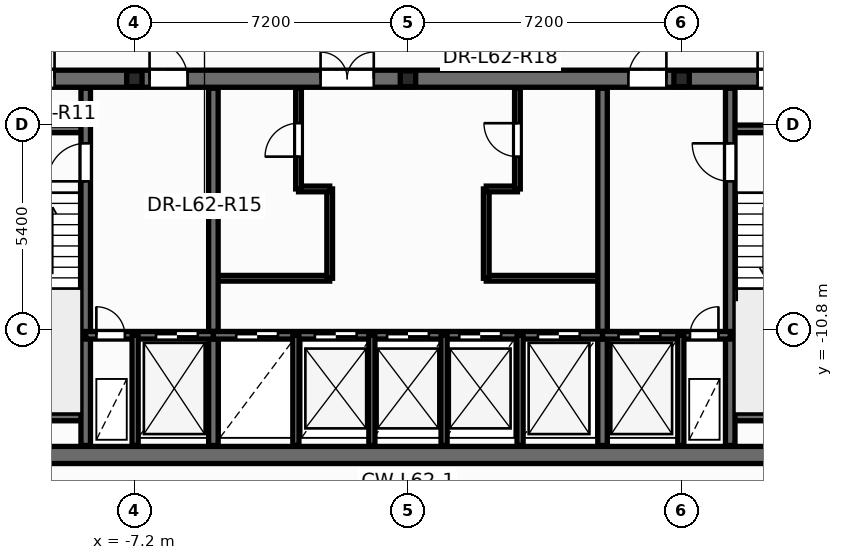
"""IFC4 building model, lengths in metres.
Left out: names, types, materials, properties, quantities, classifications, styles, units other than length and angle.
Written with IfcOpenShell. Run it as: python <this file> out.ifc"""

import sys

from ifc_helpers import new_model, si_unit, direction, frame, frame_2d, origin, origin_2d, place, context, subcontext, project, spatial, rectangle, i_section, extrude, element, fill, save


model = new_model("IFC4")
c1 = context("Model", 3, precision=1e-05, world=origin(), true_north=direction((0.0, 1.0)))
c2 = subcontext(c1, "Body", "Model", "MODEL_VIEW")
j1 = project(units=[si_unit("LENGTHUNIT", "METRE"), si_unit("PLANEANGLEUNIT", "RADIAN")], contexts=[c1])
p1 = place(None, origin())
s1 = spatial("IfcSite", under=j1, at=p1, CompositionType="ELEMENT")
p2 = place(p1, origin())
s2 = spatial("IfcBuilding", under=s1, at=p2, CompositionType="ELEMENT")
p3 = place(p2, frame((0.0, 0.0, 237.0)))
s3 = spatial("IfcBuildingStorey", under=s2, at=p3, CompositionType="ELEMENT", Elevation=237.0)
for number, where, z_axis, x_axis in (
    (1, (-7.2, -4.2, 0.0), (0.0, 0.0, 1.0), (1.0, 0.0, 0.0)),
    (2, (0.0, -4.2, 0.0), (0.0, 0.0, 1.0), (1.0, 0.0, 0.0)),
    (3, (7.2, -4.2, 0.0), (0.0, 0.0, 1.0), (1.0, 0.0, 0.0)),
):
    element("IfcColumn", number, at=place(p3, frame(where, z_axis=z_axis, x_axis=x_axis)), inside=s3, PredefinedType="PILASTER", context=c2, shape_type="SweptSolid", body=[
        extrude(i_section(OverallWidth=0.405, OverallDepth=0.414, WebThickness=0.022, FlangeThickness=0.032, at=origin_2d()), origin(), (0.0, 0.0, 1.0), 3.6),
    ])
p4 = place(p3, frame((-5.12, -9.45, 0.0), z_axis=(0.0, 0.0, 1.0), x_axis=(1.0, 0.0, 0.0)))
e4 = element("IfcWall", 4, at=p4, inside=s3, PredefinedType="PARTITIONING", context=c2, shape_type="SweptSolid", body=[
    extrude(rectangle(XDim=3.06, YDim=0.15, at=frame_2d((1.53, 0.0))), origin(), (0.0, 0.0, 1.0), 3.345),
])
p5 = place(p3, frame((-2.06, -9.45, 0.0), z_axis=(0.0, 0.0, 1.0), x_axis=(0.0, 1.0, 0.0)))
e5 = element("IfcWall", 5, at=p5, inside=s3, PredefinedType="PARTITIONING", context=c2, shape_type="SweptSolid", body=[
    extrude(rectangle(XDim=2.35, YDim=0.15, at=frame_2d((1.175, 0.0))), origin(), (0.0, 0.0, 1.0), 3.345),
])
p6 = place(p3, frame((-2.88, -7.1, 0.0), z_axis=(0.0, 0.0, 1.0), x_axis=(1.0, 0.0, 0.0)))
e6 = element("IfcWall", 6, at=p6, inside=s3, PredefinedType="PARTITIONING", context=c2, shape_type="SweptSolid", body=[
    extrude(rectangle(XDim=0.82, YDim=0.15, at=frame_2d((0.41, 0.0))), origin(), (0.0, 0.0, 1.0), 3.345),
])
p7 = place(p3, frame((-2.88, -7.1, 0.0), z_axis=(0.0, 0.0, 1.0), x_axis=(0.0, 1.0, 0.0)))
e7 = element("IfcWall", 7, at=p7, inside=s3, PredefinedType="PARTITIONING", context=c2, shape_type="SweptSolid", body=[
    extrude(rectangle(XDim=2.65, YDim=0.15, at=frame_2d((1.325, 0.0))), origin(), (0.0, 0.0, 1.0), 3.345),
])
p8 = place(p7, frame((0.85, 0.0, 0.0)))
e8 = element("IfcOpeningElement", 8, at=p8, cuts=e7, PredefinedType="OPENING", context=c2, shape_type="SweptSolid", body=[
    extrude(rectangle(XDim=0.886, YDim=2.104, at=frame_2d((0.44, 1.052))), frame((0.0, 0.085, 0.0), z_axis=(0.0, -1.0, 0.0), x_axis=(1.0, 0.0, 0.0)), (0.0, 0.0, 1.0), 0.17),
])
p9 = place(p3, frame((2.06, -9.45, 0.0), z_axis=(0.0, 0.0, 1.0), x_axis=(1.0, 0.0, 0.0)))
e9 = element("IfcWall", 9, at=p9, inside=s3, PredefinedType="PARTITIONING", context=c2, shape_type="SweptSolid", body=[
    extrude(rectangle(XDim=3.06, YDim=0.15, at=frame_2d((1.53, 0.0))), origin(), (0.0, 0.0, 1.0), 3.345),
])
p10 = place(p3, frame((2.06, -9.45, 0.0), z_axis=(0.0, 0.0, 1.0), x_axis=(0.0, 1.0, 0.0)))
e10 = element("IfcWall", 10, at=p10, inside=s3, PredefinedType="PARTITIONING", context=c2, shape_type="SweptSolid", body=[
    extrude(rectangle(XDim=2.35, YDim=0.15, at=frame_2d((1.175, 0.0))), origin(), (0.0, 0.0, 1.0), 3.345),
])
p11 = place(p3, frame((2.06, -7.1, 0.0), z_axis=(0.0, 0.0, 1.0), x_axis=(1.0, 0.0, 0.0)))
e11 = element("IfcWall", 11, at=p11, inside=s3, PredefinedType="PARTITIONING", context=c2, shape_type="SweptSolid", body=[
    extrude(rectangle(XDim=0.82, YDim=0.15, at=frame_2d((0.41, 0.0))), origin(), (0.0, 0.0, 1.0), 3.345),
])
p12 = place(p3, frame((2.88, -7.1, 0.0), z_axis=(0.0, 0.0, 1.0), x_axis=(0.0, 1.0, 0.0)))
e12 = element("IfcWall", 12, at=p12, inside=s3, PredefinedType="PARTITIONING", context=c2, shape_type="SweptSolid", body=[
    extrude(rectangle(XDim=2.65, YDim=0.15, at=frame_2d((1.325, 0.0))), origin(), (0.0, 0.0, 1.0), 3.345),
])
p13 = place(p12, frame((0.85, 0.0, 0.0)))
e13 = element("IfcOpeningElement", 13, at=p13, cuts=e12, PredefinedType="OPENING", context=c2, shape_type="SweptSolid", body=[
    extrude(rectangle(XDim=0.886, YDim=2.104, at=frame_2d((0.44, 1.052))), frame((0.0, 0.085, 0.0), z_axis=(0.0, -1.0, 0.0), x_axis=(1.0, 0.0, 0.0)), (0.0, 0.0, 1.0), 0.17),
])
p14 = place(p3, frame((-12.65, -14.1, 0.0), z_axis=(0.0, 0.0, 1.0), x_axis=(1.0, 0.0, 0.0)))
e14 = element("IfcWall", 14, at=p14, inside=s3, PredefinedType="SHEAR", context=c2, shape_type="SweptSolid", body=[
    extrude(rectangle(XDim=25.3, YDim=0.45, at=frame_2d((12.65, 0.0))), origin(), (0.0, 0.0, 1.0), 3.6),
])
p15 = place(p3, frame((-12.65, -4.2, 0.0), z_axis=(0.0, 0.0, 1.0), x_axis=(1.0, 0.0, 0.0)))
e15 = element("IfcWall", 15, at=p15, inside=s3, PredefinedType="SHEAR", context=c2, shape_type="SweptSolid", body=[
    extrude(rectangle(XDim=25.3, YDim=0.45, at=frame_2d((12.65, 0.0))), origin(), (0.0, 0.0, 1.0), 3.6),
])
p16 = place(p15, frame((0.95, 0.0, 0.0)))
e16 = element("IfcOpeningElement", 16, at=p16, cuts=e15, PredefinedType="OPENING", context=c2, shape_type="SweptSolid", body=[
    extrude(rectangle(XDim=0.756, YDim=2.054, at=frame_2d((0.375, 1.027))), frame((0.0, 0.235, 0.0), z_axis=(0.0, -1.0, 0.0), x_axis=(1.0, 0.0, 0.0)), (0.0, 0.0, 1.0), 0.47),
])
p17 = place(p15, frame((2.6, 0.0, 0.0)))
e17 = element("IfcOpeningElement", 17, at=p17, cuts=e15, PredefinedType="OPENING", context=c2, shape_type="SweptSolid", body=[
    extrude(rectangle(XDim=0.756, YDim=2.054, at=frame_2d((0.375, 1.027))), frame((0.0, 0.235, 0.0), z_axis=(0.0, -1.0, 0.0), x_axis=(1.0, 0.0, 0.0)), (0.0, 0.0, 1.0), 0.47),
])
p18 = place(p15, frame((21.85, 0.0, 0.0)))
e18 = element("IfcOpeningElement", 18, at=p18, cuts=e15, PredefinedType="OPENING", context=c2, shape_type="SweptSolid", body=[
    extrude(rectangle(XDim=0.756, YDim=2.054, at=frame_2d((0.375, 1.027))), frame((0.0, 0.235, 0.0), z_axis=(0.0, -1.0, 0.0), x_axis=(1.0, 0.0, 0.0)), (0.0, 0.0, 1.0), 0.47),
])
p19 = place(p15, frame((23.5, 0.0, 0.0)))
e19 = element("IfcOpeningElement", 19, at=p19, cuts=e15, PredefinedType="OPENING", context=c2, shape_type="SweptSolid", body=[
    extrude(rectangle(XDim=0.756, YDim=2.054, at=frame_2d((0.375, 1.027))), frame((0.0, 0.235, 0.0), z_axis=(0.0, -1.0, 0.0), x_axis=(1.0, 0.0, 0.0)), (0.0, 0.0, 1.0), 0.47),
])
p20 = place(p15, frame((5.85, 0.0, 0.0)))
e20 = element("IfcOpeningElement", 20, at=p20, cuts=e15, PredefinedType="OPENING", context=c2, shape_type="SweptSolid", body=[
    extrude(rectangle(XDim=1.006, YDim=2.104, at=frame_2d((0.5, 1.052))), frame((0.0, 0.235, 0.0), z_axis=(0.0, -1.0, 0.0), x_axis=(1.0, 0.0, 0.0)), (0.0, 0.0, 1.0), 0.47),
])
p21 = place(p15, frame((10.35, 0.0, 0.0)))
e21 = element("IfcOpeningElement", 21, at=p21, cuts=e15, PredefinedType="OPENING", context=c2, shape_type="SweptSolid", body=[
    extrude(rectangle(XDim=1.406, YDim=2.154, at=frame_2d((0.7, 1.077))), frame((0.0, 0.235, 0.0), z_axis=(0.0, -1.0, 0.0), x_axis=(1.0, 0.0, 0.0)), (0.0, 0.0, 1.0), 0.47),
])
p22 = place(p15, frame((18.45, 0.0, 0.0)))
e22 = element("IfcOpeningElement", 22, at=p22, cuts=e15, PredefinedType="OPENING", context=c2, shape_type="SweptSolid", body=[
    extrude(rectangle(XDim=1.006, YDim=2.104, at=frame_2d((0.5, 1.052))), frame((0.0, 0.235, 0.0), z_axis=(0.0, -1.0, 0.0), x_axis=(1.0, 0.0, 0.0)), (0.0, 0.0, 1.0), 0.47),
])
for number, where, z_axis, x_axis in (
    (23, (-12.35, -5.52, 0.0), (0.0, 0.0, 1.0), (1.0, 0.0, 0.0)),
    (24, (-12.35, -13.1, 0.0), (0.0, 0.0, 1.0), (1.0, 0.0, 0.0)),
    (25, (8.48, -5.52, 0.0), (0.0, 0.0, 1.0), (1.0, 0.0, 0.0)),
    (26, (8.48, -13.1, 0.0), (0.0, 0.0, 1.0), (1.0, 0.0, 0.0)),
):
    element("IfcWall", number, at=place(p3, frame(where, z_axis=z_axis, x_axis=x_axis)), inside=s3, PredefinedType="SOLIDWALL", context=c2, shape_type="SweptSolid", body=[
        extrude(rectangle(XDim=3.87, YDim=0.2, at=frame_2d((1.935, 0.0))), origin(), (0.0, 0.0, 1.0), 3.6),
    ])
p23 = place(p3, frame((-8.48, -13.85, 0.0), z_axis=(0.0, 0.0, 1.0), x_axis=(0.0, 1.0, 0.0)))
e27 = element("IfcWall", 27, at=p23, inside=s3, PredefinedType="SHEAR", context=c2, shape_type="SweptSolid", body=[
    extrude(rectangle(XDim=9.4, YDim=0.25, at=frame_2d((4.7, 0.0))), origin(), (0.0, 0.0, 1.0), 3.6),
])
p24 = place(p23, frame((6.95, 0.0, 0.0)))
e28 = element("IfcOpeningElement", 28, at=p24, cuts=e27, PredefinedType="OPENING", context=c2, shape_type="SweptSolid", body=[
    extrude(rectangle(XDim=1.006, YDim=2.104, at=frame_2d((0.5, 1.052))), frame((0.0, 0.135, 0.0), z_axis=(0.0, -1.0, 0.0), x_axis=(1.0, 0.0, 0.0)), (0.0, 0.0, 1.0), 0.27),
])
p25 = place(p3, frame((8.48, -13.85, 0.0), z_axis=(0.0, 0.0, 1.0), x_axis=(0.0, 1.0, 0.0)))
e29 = element("IfcWall", 29, at=p25, inside=s3, PredefinedType="SHEAR", context=c2, shape_type="SweptSolid", body=[
    extrude(rectangle(XDim=9.4, YDim=0.25, at=frame_2d((4.7, 0.0))), origin(), (0.0, 0.0, 1.0), 3.6),
])
p26 = place(p25, frame((6.95, 0.0, 0.0)))
e30 = element("IfcOpeningElement", 30, at=p26, cuts=e29, PredefinedType="OPENING", context=c2, shape_type="SweptSolid", body=[
    extrude(rectangle(XDim=1.006, YDim=2.104, at=frame_2d((0.5, 1.052))), frame((0.0, 0.135, 0.0), z_axis=(0.0, -1.0, 0.0), x_axis=(1.0, 0.0, 0.0)), (0.0, 0.0, 1.0), 0.27),
])
for number, where, z_axis, x_axis in (
    (31, (-5.12, -13.85, 0.0), (0.0, 0.0, 1.0), (0.0, 1.0, 0.0)),
    (32, (5.12, -13.85, 0.0), (0.0, 0.0, 1.0), (0.0, 1.0, 0.0)),
):
    element("IfcWall", number, at=place(p3, frame(where, z_axis=z_axis, x_axis=x_axis)), inside=s3, PredefinedType="SHEAR", context=c2, shape_type="SweptSolid", body=[
        extrude(rectangle(XDim=9.4, YDim=0.25, at=frame_2d((4.7, 0.0))), origin(), (0.0, 0.0, 1.0), 3.6),
    ])
p27 = place(p3, frame((-8.48, -10.95, 0.0), z_axis=(0.0, 0.0, 1.0), x_axis=(1.0, 0.0, 0.0)))
e33 = element("IfcWall", 33, at=p27, inside=s3, PredefinedType="SOLIDWALL", context=c2, shape_type="SweptSolid", body=[
    extrude(rectangle(XDim=3.36, YDim=0.2, at=frame_2d((1.68, 0.0))), origin(), (0.0, 0.0, 1.0), 3.6),
])
p28 = place(p27, frame((0.28, 0.0, 0.0)))
e34 = element("IfcOpeningElement", 34, at=p28, cuts=e33, PredefinedType="OPENING", context=c2, shape_type="SweptSolid", body=[
    extrude(rectangle(XDim=0.756, YDim=2.054, at=frame_2d((0.375, 1.027))), frame((0.0, 0.11, 0.0), z_axis=(0.0, -1.0, 0.0), x_axis=(1.0, 0.0, 0.0)), (0.0, 0.0, 1.0), 0.22),
])
p29 = place(p27, frame((1.85, 0.0, 0.0)))
e35 = element("IfcOpeningElement", 35, at=p29, cuts=e33, PredefinedType="OPENING", context=c2, shape_type="SweptSolid", body=[
    extrude(rectangle(XDim=1.106, YDim=2.104, at=frame_2d((0.55, 1.052))), frame((0.0, 0.11, 0.0), z_axis=(0.0, -1.0, 0.0), x_axis=(1.0, 0.0, 0.0)), (0.0, 0.0, 1.0), 0.22),
])
p30 = place(p3, frame((-5.12, -10.95, 0.0), z_axis=(0.0, 0.0, 1.0), x_axis=(1.0, 0.0, 0.0)))
e36 = element("IfcWall", 36, at=p30, inside=s3, PredefinedType="SOLIDWALL", context=c2, shape_type="SweptSolid", body=[
    extrude(rectangle(XDim=10.24, YDim=0.2, at=frame_2d((5.12, 0.0))), origin(), (0.0, 0.0, 1.0), 3.6),
])
p31 = place(p30, frame((0.6, 0.0, 0.0)))
e37 = element("IfcOpeningElement", 37, at=p31, cuts=e36, PredefinedType="OPENING", context=c2, shape_type="SweptSolid", body=[
    extrude(rectangle(XDim=1.106, YDim=2.104, at=frame_2d((0.55, 1.052))), frame((0.0, 0.11, 0.0), z_axis=(0.0, -1.0, 0.0), x_axis=(1.0, 0.0, 0.0)), (0.0, 0.0, 1.0), 0.22),
])
p32 = place(p30, frame((2.67, 0.0, 0.0)))
e38 = element("IfcOpeningElement", 38, at=p32, cuts=e36, PredefinedType="OPENING", context=c2, shape_type="SweptSolid", body=[
    extrude(rectangle(XDim=1.106, YDim=2.104, at=frame_2d((0.55, 1.052))), frame((0.0, 0.11, 0.0), z_axis=(0.0, -1.0, 0.0), x_axis=(1.0, 0.0, 0.0)), (0.0, 0.0, 1.0), 0.22),
])
p33 = place(p30, frame((4.57, 0.0, 0.0)))
e39 = element("IfcOpeningElement", 39, at=p33, cuts=e36, PredefinedType="OPENING", context=c2, shape_type="SweptSolid", body=[
    extrude(rectangle(XDim=1.106, YDim=2.104, at=frame_2d((0.55, 1.052))), frame((0.0, 0.11, 0.0), z_axis=(0.0, -1.0, 0.0), x_axis=(1.0, 0.0, 0.0)), (0.0, 0.0, 1.0), 0.22),
])
p34 = place(p30, frame((6.47, 0.0, 0.0)))
e40 = element("IfcOpeningElement", 40, at=p34, cuts=e36, PredefinedType="OPENING", context=c2, shape_type="SweptSolid", body=[
    extrude(rectangle(XDim=1.106, YDim=2.104, at=frame_2d((0.55, 1.052))), frame((0.0, 0.11, 0.0), z_axis=(0.0, -1.0, 0.0), x_axis=(1.0, 0.0, 0.0)), (0.0, 0.0, 1.0), 0.22),
])
p35 = place(p30, frame((8.54, 0.0, 0.0)))
e41 = element("IfcOpeningElement", 41, at=p35, cuts=e36, PredefinedType="OPENING", context=c2, shape_type="SweptSolid", body=[
    extrude(rectangle(XDim=1.106, YDim=2.104, at=frame_2d((0.55, 1.052))), frame((0.0, 0.11, 0.0), z_axis=(0.0, -1.0, 0.0), x_axis=(1.0, 0.0, 0.0)), (0.0, 0.0, 1.0), 0.22),
])
p36 = place(p3, frame((5.12, -10.95, 0.0), z_axis=(0.0, 0.0, 1.0), x_axis=(1.0, 0.0, 0.0)))
e42 = element("IfcWall", 42, at=p36, inside=s3, PredefinedType="SOLIDWALL", context=c2, shape_type="SweptSolid", body=[
    extrude(rectangle(XDim=3.36, YDim=0.2, at=frame_2d((1.68, 0.0))), origin(), (0.0, 0.0, 1.0), 3.6),
])
p37 = place(p36, frame((0.42, 0.0, 0.0)))
e43 = element("IfcOpeningElement", 43, at=p37, cuts=e42, PredefinedType="OPENING", context=c2, shape_type="SweptSolid", body=[
    extrude(rectangle(XDim=1.106, YDim=2.104, at=frame_2d((0.55, 1.052))), frame((0.0, 0.11, 0.0), z_axis=(0.0, -1.0, 0.0), x_axis=(1.0, 0.0, 0.0)), (0.0, 0.0, 1.0), 0.22),
])
p38 = place(p36, frame((2.3, 0.0, 0.0)))
e44 = element("IfcOpeningElement", 44, at=p38, cuts=e42, PredefinedType="OPENING", context=c2, shape_type="SweptSolid", body=[
    extrude(rectangle(XDim=0.756, YDim=2.054, at=frame_2d((0.375, 1.027))), frame((0.0, 0.11, 0.0), z_axis=(0.0, -1.0, 0.0), x_axis=(1.0, 0.0, 0.0)), (0.0, 0.0, 1.0), 0.22),
])
for number, where, z_axis, x_axis in (
    (45, (-7.18, -13.85, 0.0), (0.0, 0.0, 1.0), (0.0, 1.0, 0.0)),
    (46, (7.18, -13.85, 0.0), (0.0, 0.0, 1.0), (0.0, 1.0, 0.0)),
    (47, (-2.95, -13.85, 0.0), (0.0, 0.0, 1.0), (0.0, 1.0, 0.0)),
    (48, (2.95, -13.85, 0.0), (0.0, 0.0, 1.0), (0.0, 1.0, 0.0)),
    (49, (-0.95, -13.85, 0.0), (0.0, 0.0, 1.0), (0.0, 1.0, 0.0)),
    (50, (0.95, -13.85, 0.0), (0.0, 0.0, 1.0), (0.0, 1.0, 0.0)),
):
    element("IfcWall", number, at=place(p3, frame(where, z_axis=z_axis, x_axis=x_axis)), inside=s3, PredefinedType="PARTITIONING", context=c2, shape_type="SweptSolid", body=[
        extrude(rectangle(XDim=2.9, YDim=0.16, at=frame_2d((1.45, 0.0))), origin(), (0.0, 0.0, 1.0), 2.57),
    ])
p39 = place(p8, origin())
e51 = element("IfcDoor", 51, at=p39, inside=s3, OperationType="SINGLE_SWING_LEFT", PredefinedType="DOOR", context=c2, shape_type="SweptSolid", body=[
    extrude(rectangle(XDim=0.88, YDim=2.1, at=frame_2d((0.44, 1.05))), frame((0.0, 0.025, 0.0), z_axis=(0.0, -1.0, 0.0), x_axis=(1.0, 0.0, 0.0)), (0.0, 0.0, 1.0), 0.05),
])
fill(e8, e51)
p40 = place(p13, origin())
e52 = element("IfcDoor", 52, at=p40, inside=s3, OperationType="SINGLE_SWING_RIGHT", PredefinedType="DOOR", context=c2, shape_type="SweptSolid", body=[
    extrude(rectangle(XDim=0.88, YDim=2.1, at=frame_2d((0.44, 1.05))), frame((0.0, 0.025, 0.0), z_axis=(0.0, -1.0, 0.0), x_axis=(1.0, 0.0, 0.0)), (0.0, 0.0, 1.0), 0.05),
])
fill(e13, e52)
p41 = place(p24, origin())
e53 = element("IfcDoor", 53, at=p41, inside=s3, OperationType="SINGLE_SWING_LEFT", PredefinedType="DOOR", context=c2, shape_type="SweptSolid", body=[
    extrude(rectangle(XDim=1.0, YDim=2.1, at=frame_2d((0.5, 1.05))), frame((0.0, 0.025, 0.0), z_axis=(0.0, -1.0, 0.0), x_axis=(1.0, 0.0, 0.0)), (0.0, 0.0, 1.0), 0.05),
])
fill(e28, e53)
p42 = place(p26, origin())
e54 = element("IfcDoor", 54, at=p42, inside=s3, OperationType="SINGLE_SWING_RIGHT", PredefinedType="DOOR", context=c2, shape_type="SweptSolid", body=[
    extrude(rectangle(XDim=1.0, YDim=2.1, at=frame_2d((0.5, 1.05))), frame((0.0, 0.025, 0.0), z_axis=(0.0, -1.0, 0.0), x_axis=(1.0, 0.0, 0.0)), (0.0, 0.0, 1.0), 0.05),
])
fill(e30, e54)
p43 = place(p28, origin())
e55 = element("IfcDoor", 55, at=p43, inside=s3, OperationType="SINGLE_SWING_LEFT", PredefinedType="DOOR", context=c2, shape_type="SweptSolid", body=[
    extrude(rectangle(XDim=0.75, YDim=2.05, at=frame_2d((0.375, 1.025))), frame((0.0, 0.025, 0.0), z_axis=(0.0, -1.0, 0.0), x_axis=(1.0, 0.0, 0.0)), (0.0, 0.0, 1.0), 0.05),
])
fill(e34, e55)
p44 = place(p29, origin())
e56 = element("IfcDoor", 56, at=p44, inside=s3, OperationType="DOUBLE_DOOR_SLIDING", PredefinedType="DOOR", context=c2, shape_type="SweptSolid", body=[
    extrude(rectangle(XDim=1.1, YDim=2.1, at=frame_2d((0.55, 1.05))), frame((0.0, 0.025, 0.0), z_axis=(0.0, -1.0, 0.0), x_axis=(1.0, 0.0, 0.0)), (0.0, 0.0, 1.0), 0.05),
])
fill(e35, e56)
p45 = place(p37, origin())
e57 = element("IfcDoor", 57, at=p45, inside=s3, OperationType="DOUBLE_DOOR_SLIDING", PredefinedType="DOOR", context=c2, shape_type="SweptSolid", body=[
    extrude(rectangle(XDim=1.1, YDim=2.1, at=frame_2d((0.55, 1.05))), frame((0.0, 0.025, 0.0), z_axis=(0.0, -1.0, 0.0), x_axis=(1.0, 0.0, 0.0)), (0.0, 0.0, 1.0), 0.05),
])
fill(e43, e57)
p46 = place(p38, origin())
e58 = element("IfcDoor", 58, at=p46, inside=s3, OperationType="SINGLE_SWING_RIGHT", PredefinedType="DOOR", context=c2, shape_type="SweptSolid", body=[
    extrude(rectangle(XDim=0.75, YDim=2.05, at=frame_2d((0.375, 1.025))), frame((0.0, 0.025, 0.0), z_axis=(0.0, -1.0, 0.0), x_axis=(1.0, 0.0, 0.0)), (0.0, 0.0, 1.0), 0.05),
])
fill(e44, e58)
p47 = place(p31, origin())
e59 = element("IfcDoor", 59, at=p47, inside=s3, OperationType="DOUBLE_DOOR_SLIDING", PredefinedType="DOOR", context=c2, shape_type="SweptSolid", body=[
    extrude(rectangle(XDim=1.1, YDim=2.1, at=frame_2d((0.55, 1.05))), frame((0.0, 0.025, 0.0), z_axis=(0.0, -1.0, 0.0), x_axis=(1.0, 0.0, 0.0)), (0.0, 0.0, 1.0), 0.05),
])
fill(e37, e59)
p48 = place(p32, origin())
e60 = element("IfcDoor", 60, at=p48, inside=s3, OperationType="DOUBLE_DOOR_SLIDING", PredefinedType="DOOR", context=c2, shape_type="SweptSolid", body=[
    extrude(rectangle(XDim=1.1, YDim=2.1, at=frame_2d((0.55, 1.05))), frame((0.0, 0.025, 0.0), z_axis=(0.0, -1.0, 0.0), x_axis=(1.0, 0.0, 0.0)), (0.0, 0.0, 1.0), 0.05),
])
fill(e38, e60)
p49 = place(p33, origin())
e61 = element("IfcDoor", 61, at=p49, inside=s3, OperationType="DOUBLE_DOOR_SLIDING", PredefinedType="DOOR", context=c2, shape_type="SweptSolid", body=[
    extrude(rectangle(XDim=1.1, YDim=2.1, at=frame_2d((0.55, 1.05))), frame((0.0, 0.025, 0.0), z_axis=(0.0, -1.0, 0.0), x_axis=(1.0, 0.0, 0.0)), (0.0, 0.0, 1.0), 0.05),
])
fill(e39, e61)
p50 = place(p34, origin())
e62 = element("IfcDoor", 62, at=p50, inside=s3, OperationType="DOUBLE_DOOR_SLIDING", PredefinedType="DOOR", context=c2, shape_type="SweptSolid", body=[
    extrude(rectangle(XDim=1.1, YDim=2.1, at=frame_2d((0.55, 1.05))), frame((0.0, 0.025, 0.0), z_axis=(0.0, -1.0, 0.0), x_axis=(1.0, 0.0, 0.0)), (0.0, 0.0, 1.0), 0.05),
])
fill(e40, e62)
p51 = place(p35, origin())
e63 = element("IfcDoor", 63, at=p51, inside=s3, OperationType="DOUBLE_DOOR_SLIDING", PredefinedType="DOOR", context=c2, shape_type="SweptSolid", body=[
    extrude(rectangle(XDim=1.1, YDim=2.1, at=frame_2d((0.55, 1.05))), frame((0.0, 0.025, 0.0), z_axis=(0.0, -1.0, 0.0), x_axis=(1.0, 0.0, 0.0)), (0.0, 0.0, 1.0), 0.05),
])
fill(e41, e63)
p52 = place(p17, origin())
e64 = element("IfcDoor", 64, at=p52, inside=s3, OperationType="SINGLE_SWING_RIGHT", PredefinedType="DOOR", context=c2, shape_type="SweptSolid", body=[
    extrude(rectangle(XDim=0.75, YDim=2.05, at=frame_2d((0.375, 1.025))), frame((0.0, 0.025, 0.0), z_axis=(0.0, -1.0, 0.0), x_axis=(1.0, 0.0, 0.0)), (0.0, 0.0, 1.0), 0.05),
])
fill(e17, e64)
p53 = place(p18, origin())
e65 = element("IfcDoor", 65, at=p53, inside=s3, OperationType="SINGLE_SWING_LEFT", PredefinedType="DOOR", context=c2, shape_type="SweptSolid", body=[
    extrude(rectangle(XDim=0.75, YDim=2.05, at=frame_2d((0.375, 1.025))), frame((0.0, 0.025, 0.0), z_axis=(0.0, -1.0, 0.0), x_axis=(1.0, 0.0, 0.0)), (0.0, 0.0, 1.0), 0.05),
])
fill(e18, e65)
p54 = place(p20, origin())
e66 = element("IfcDoor", 66, at=p54, inside=s3, OperationType="SINGLE_SWING_LEFT", PredefinedType="DOOR", context=c2, shape_type="SweptSolid", body=[
    extrude(rectangle(XDim=1.0, YDim=2.1, at=frame_2d((0.5, 1.05))), frame((0.0, 0.025, 0.0), z_axis=(0.0, -1.0, 0.0), x_axis=(1.0, 0.0, 0.0)), (0.0, 0.0, 1.0), 0.05),
])
fill(e20, e66)
p55 = place(p21, origin())
e67 = element("IfcDoor", 67, at=p55, inside=s3, OperationType="DOUBLE_DOOR_SINGLE_SWING", PredefinedType="DOOR", context=c2, shape_type="SweptSolid", body=[
    extrude(rectangle(XDim=1.4, YDim=2.15, at=frame_2d((0.7, 1.075))), frame((0.0, 0.025, 0.0), z_axis=(0.0, -1.0, 0.0), x_axis=(1.0, 0.0, 0.0)), (0.0, 0.0, 1.0), 0.05),
])
fill(e21, e67)
p56 = place(p22, origin())
e68 = element("IfcDoor", 68, at=p56, inside=s3, OperationType="SINGLE_SWING_RIGHT", PredefinedType="DOOR", context=c2, shape_type="SweptSolid", body=[
    extrude(rectangle(XDim=1.0, YDim=2.1, at=frame_2d((0.5, 1.05))), frame((0.0, 0.025, 0.0), z_axis=(0.0, -1.0, 0.0), x_axis=(1.0, 0.0, 0.0)), (0.0, 0.0, 1.0), 0.05),
])
fill(e22, e68)
save(model, sys.argv[1])
